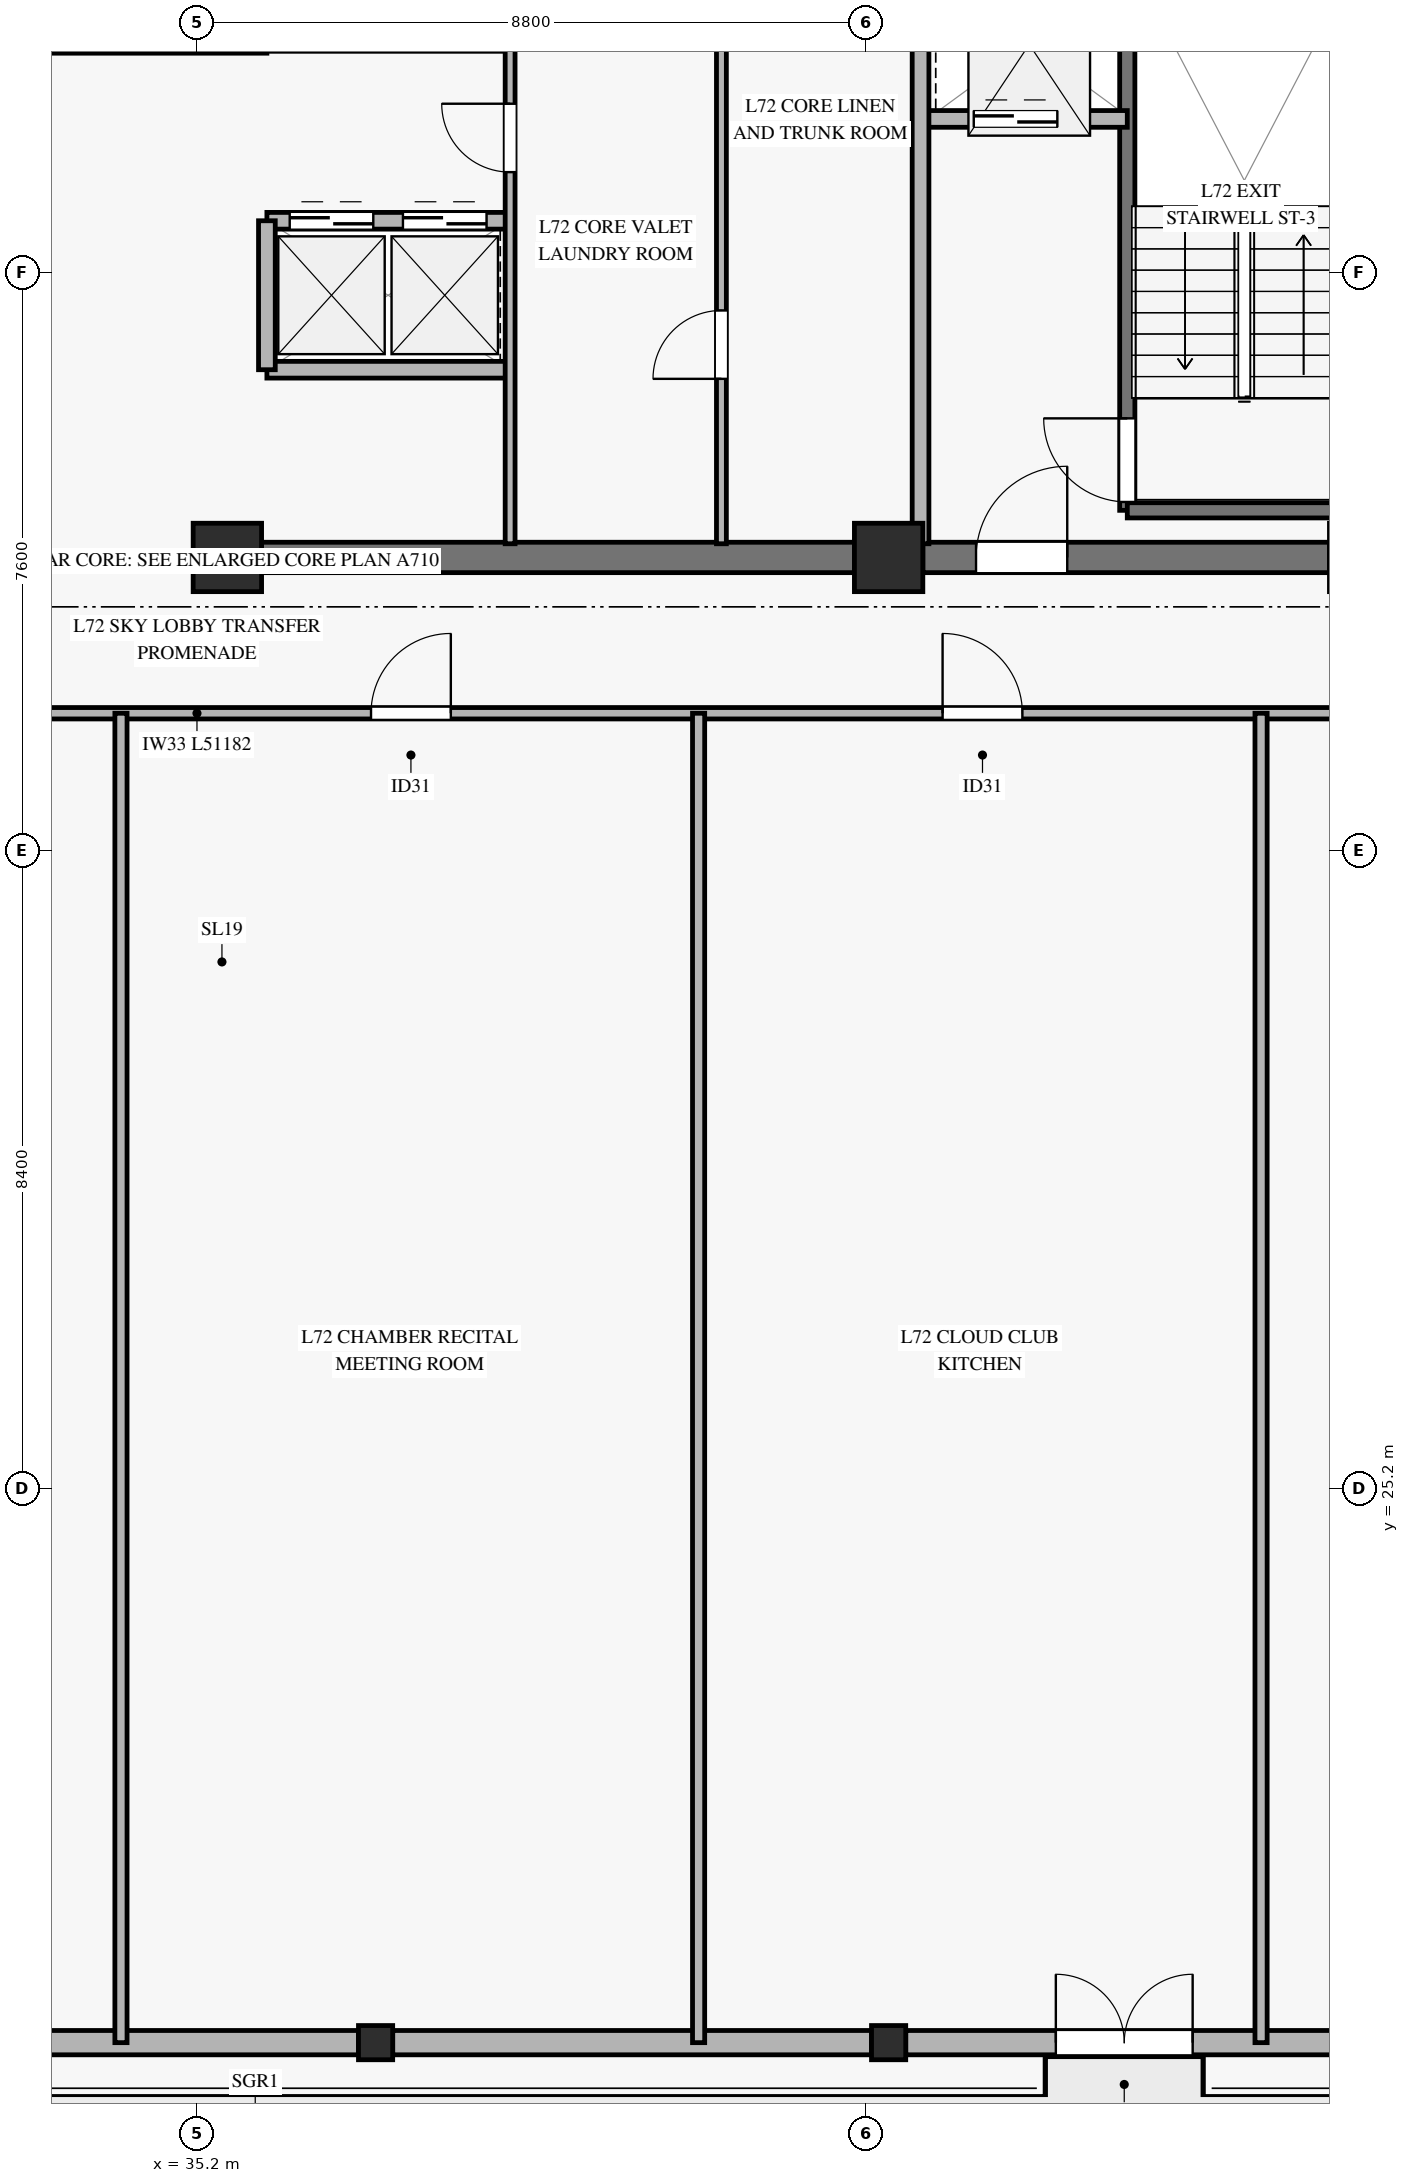
"""IFC4 building model, lengths in metres.
Left out: names, types, materials, properties, quantities, classifications, styles, units other than length and angle.
Written with IfcOpenShell. Run it as: python <this file> out.ifc"""

import sys

from ifc_helpers import new_model, si_unit, direction, frame, frame_2d, origin, origin_2d, place, context, subcontext, project, spatial, rectangle, hollow_rectangle, extrude, source, transform, mapped, element, fill, save


model = new_model("IFC4")
c1 = context("Model", 3, precision=1e-05, world=origin(), true_north=direction((0.0, 1.0)))
c2 = subcontext(c1, "Body", "Model", "MODEL_VIEW")
j1 = project(units=[si_unit("LENGTHUNIT", "METRE"), si_unit("PLANEANGLEUNIT", "RADIAN")], contexts=[c1])
p1 = place(None, origin())
s1 = spatial("IfcSite", under=j1, at=p1, CompositionType="ELEMENT")
p2 = place(p1, origin())
s2 = spatial("IfcBuilding", under=s1, at=p2, CompositionType="ELEMENT")
p3 = place(p2, frame((0.0, 0.0, 279.1)))
s3 = spatial("IfcBuildingStorey", under=s2, at=p3, CompositionType="ELEMENT", Elevation=279.1)
m1 = source(origin(), c2, "Body", "SweptSolid", [
    extrude(rectangle(XDim=0.9, YDim=0.9, at=origin_2d()), origin(), (0.0, 0.0, 1.0), 6.52),
])
for number, where, z_axis, x_axis in (
    (1, (35.6, 37.45, 0.0), (0.0, 0.0, 1.0), (1.0, 0.0, 0.0)),
    (2, (44.3, 37.45, 0.0), (0.0, 0.0, 1.0), (1.0, 0.0, 0.0)),
):
    element("IfcColumn", number, at=place(p3, frame(where, z_axis=z_axis, x_axis=x_axis)), inside=s3, PredefinedType="PILASTER", context=c2, shape_type="MappedRepresentation", body=[
        mapped(m1, transform((0.0, 0.0, 0.0), x_axis=(1.0, 0.0, 0.0), y_axis=(0.0, 1.0, 0.0), z_axis=(0.0, 0.0, 1.0), scale=1.0)),
    ])
p4 = place(p3, frame((36.05, 37.45, 0.0), z_axis=(0.0, 0.0, 1.0), x_axis=(1.0, 0.0, 0.0)))
e3 = element("IfcWall", 3, at=p4, inside=s3, PredefinedType="SHEAR", context=c2, shape_type="SweptSolid", body=[
    extrude(rectangle(XDim=7.8, YDim=0.4, at=frame_2d((3.9, 0.0))), origin(), (0.0, 0.0, 1.0), 6.52),
])
p5 = place(p3, frame((44.75, 37.45, 0.0), z_axis=(0.0, 0.0, 1.0), x_axis=(1.0, 0.0, 0.0)))
e4 = element("IfcWall", 4, at=p5, inside=s3, PredefinedType="SHEAR", context=c2, shape_type="SweptSolid", body=[
    extrude(rectangle(XDim=5.35, YDim=0.4, at=frame_2d((2.675, 0.0))), origin(), (0.0, 0.0, 1.0), 6.52),
])
p6 = place(p5, frame((0.7, 0.0, 0.0)))
e5 = element("IfcOpeningElement", 5, at=p6, cuts=e4, PredefinedType="OPENING", context=c2, shape_type="SweptSolid", body=[
    extrude(rectangle(XDim=1.2, YDim=2.15, at=frame_2d((0.6, 1.075))), frame((0.0, 0.21, 0.0), z_axis=(0.0, -1.0, 0.0), x_axis=(1.0, 0.0, 0.0)), (0.0, 0.0, 1.0), 0.42),
])
m2 = source(origin(), c2, "Body", "SweptSolid", [
    extrude(hollow_rectangle(XDim=0.45, YDim=0.45, WallThickness=0.022, at=origin_2d()), origin(), (0.0, 0.0, 1.0), 6.52),
])
for number, where, z_axis, x_axis in (
    (6, (37.55, 17.908, 0.0), (0.0, 0.0, 1.0), (1.0, 0.0, 0.0)),
    (7, (44.3, 17.908, 0.0), (0.0, 0.0, 1.0), (1.0, 0.0, 0.0)),
):
    element("IfcColumn", number, at=place(p3, frame(where, z_axis=z_axis, x_axis=x_axis)), inside=s3, PredefinedType="COLUMN", context=c2, shape_type="MappedRepresentation", body=[
        mapped(m2, transform((0.0, 0.0, 0.0), x_axis=(1.0, 0.0, 0.0), y_axis=(0.0, 1.0, 0.0), z_axis=(0.0, 0.0, 1.0), scale=1.0)),
    ])
for number, where, z_axis, x_axis in (
    (8, (31.025, 17.908, 0.0), (0.0, 0.0, 1.0), (1.0, 0.0, 0.0)),
    (9, (37.775, 17.908, 0.0), (0.0, 0.0, 1.0), (1.0, 0.0, 0.0)),
):
    element("IfcWall", number, at=place(p3, frame(where, z_axis=z_axis, x_axis=x_axis)), inside=s3, PredefinedType="SOLIDWALL", context=c2, shape_type="SweptSolid", body=[
        extrude(rectangle(XDim=6.3, YDim=0.32, at=frame_2d((3.15, 0.0))), origin(), (0.0, 0.0, 1.0), 6.15),
    ])
p7 = place(p3, frame((44.525, 17.908, 0.0), z_axis=(0.0, 0.0, 1.0), x_axis=(1.0, 0.0, 0.0)))
e10 = element("IfcWall", 10, at=p7, inside=s3, PredefinedType="SOLIDWALL", context=c2, shape_type="SweptSolid", body=[
    extrude(rectangle(XDim=5.8, YDim=0.32, at=frame_2d((2.9, 0.0))), origin(), (0.0, 0.0, 1.0), 6.15),
])
p8 = place(p7, frame((1.975, 0.0, 0.0)))
e11 = element("IfcOpeningElement", 11, at=p8, cuts=e10, PredefinedType="OPENING", context=c2, shape_type="SweptSolid", body=[
    extrude(rectangle(XDim=1.8, YDim=2.3, at=frame_2d((0.9, 1.15))), frame((0.0, 0.17, 0.0), z_axis=(0.0, -1.0, 0.0), x_axis=(1.0, 0.0, 0.0)), (0.0, 0.0, 1.0), 0.34),
])
p9 = place(p3, frame((47.44, 38.07, 0.0), z_axis=(0.0, 0.0, 1.0), x_axis=(0.0, 1.0, 0.0)))
e12 = element("IfcWall", 12, at=p9, inside=s3, PredefinedType="SOLIDWALL", context=c2, shape_type="SweptSolid", body=[
    extrude(rectangle(XDim=7.25, YDim=0.2, at=frame_2d((3.625, 0.0))), origin(), (0.0, 0.0, 1.0), 6.8),
])
p10 = place(p9, frame((0.11, 0.0, 0.0)))
e13 = element("IfcOpeningElement", 13, at=p10, cuts=e12, PredefinedType="OPENING", context=c2, shape_type="SweptSolid", body=[
    extrude(rectangle(XDim=1.1, YDim=2.15, at=frame_2d((0.55, 1.075))), frame((0.0, 0.11, 0.0), z_axis=(0.0, -1.0, 0.0), x_axis=(1.0, 0.0, 0.0)), (0.0, 0.0, 1.0), 0.22),
])
p11 = place(p3, frame((47.44, 38.07, 0.0), z_axis=(0.0, 0.0, 1.0), x_axis=(1.0, 0.0, 0.0)))
e14 = element("IfcWall", 14, at=p11, inside=s3, PredefinedType="SOLIDWALL", context=c2, shape_type="SweptSolid", body=[
    extrude(rectangle(XDim=2.93, YDim=0.2, at=frame_2d((1.465, 0.0))), origin(), (0.0, 0.0, 1.0), 6.8),
])
p12 = place(p3, frame((44.72, 43.22, 0.0), z_axis=(0.0, 0.0, 1.0), x_axis=(1.0, 0.0, 0.0)))
e15 = element("IfcWall", 15, at=p12, inside=s3, PredefinedType="SOLIDWALL", context=c2, shape_type="SweptSolid", body=[
    extrude(rectangle(XDim=2.72, YDim=0.22, at=frame_2d((1.36, 0.0))), origin(), (0.0, 0.0, 1.0), 6.52),
])
p13 = place(p12, frame((0.7, 0.0, 0.0)))
e16 = element("IfcOpeningElement", 16, at=p13, cuts=e15, PredefinedType="OPENING", context=c2, shape_type="SweptSolid", body=[
    extrude(rectangle(XDim=1.1, YDim=2.2, at=frame_2d((0.55, 1.1))), frame((0.0, 0.12, 0.0), z_axis=(0.0, -1.0, 0.0), x_axis=(1.0, 0.0, 0.0)), (0.0, 0.0, 1.0), 0.24),
])
p14 = place(p3, frame((44.72, 37.63, 0.0), z_axis=(0.0, 0.0, 1.0), x_axis=(0.0, 1.0, 0.0)))
e17 = element("IfcWall", 17, at=p14, inside=s3, PredefinedType="SOLIDWALL", context=c2, shape_type="SweptSolid", body=[
    extrude(rectangle(XDim=7.59, YDim=0.22, at=frame_2d((3.795, 0.0))), origin(), (0.0, 0.0, 1.0), 6.52),
])
p15 = place(p3, frame((36.12, 41.88, 0.0), z_axis=(0.0, 0.0, 1.0), x_axis=(1.0, 0.0, 0.0)))
e18 = element("IfcWall", 18, at=p15, inside=s3, PredefinedType="SOLIDWALL", context=c2, shape_type="SweptSolid", body=[
    extrude(rectangle(XDim=3.2, YDim=0.22, at=frame_2d((1.6, 0.0))), origin(), (0.0, 0.0, 1.0), 6.52),
])
p16 = place(p15, frame((0.3, 0.0, 0.0)))
e19 = element("IfcOpeningElement", 19, at=p16, cuts=e18, PredefinedType="OPENING", context=c2, shape_type="SweptSolid", body=[
    extrude(rectangle(XDim=1.1, YDim=2.2, at=frame_2d((0.55, 1.1))), frame((0.0, 0.12, 0.0), z_axis=(0.0, -1.0, 0.0), x_axis=(1.0, 0.0, 0.0)), (0.0, 0.0, 1.0), 0.24),
])
p17 = place(p15, frame((1.79, 0.0, 0.0)))
e20 = element("IfcOpeningElement", 20, at=p17, cuts=e18, PredefinedType="OPENING", context=c2, shape_type="SweptSolid", body=[
    extrude(rectangle(XDim=1.1, YDim=2.2, at=frame_2d((0.55, 1.1))), frame((0.0, 0.12, 0.0), z_axis=(0.0, -1.0, 0.0), x_axis=(1.0, 0.0, 0.0)), (0.0, 0.0, 1.0), 0.24),
])
p18 = place(p3, frame((36.12, 39.92, 0.0), z_axis=(0.0, 0.0, 1.0), x_axis=(1.0, 0.0, 0.0)))
e21 = element("IfcWall", 21, at=p18, inside=s3, PredefinedType="SOLIDWALL", context=c2, shape_type="SweptSolid", body=[
    extrude(rectangle(XDim=3.2, YDim=0.22, at=frame_2d((1.6, 0.0))), origin(), (0.0, 0.0, 1.0), 6.52),
])
p19 = place(p3, frame((36.12, 39.92, 0.0), z_axis=(0.0, 0.0, 1.0), x_axis=(0.0, 1.0, 0.0)))
e22 = element("IfcWall", 22, at=p19, inside=s3, PredefinedType="SOLIDWALL", context=c2, shape_type="SweptSolid", body=[
    extrude(rectangle(XDim=1.96, YDim=0.22, at=frame_2d((0.98, 0.0))), origin(), (0.0, 0.0, 1.0), 6.52),
])
p20 = place(p3, frame((33.18, 44.15, 0.0), z_axis=(0.0, 0.0, 1.0), x_axis=(1.0, 0.0, 0.0)))
e23 = element("IfcWall", 23, at=p20, inside=s3, PredefinedType="PARTITIONING", context=c2, shape_type="SweptSolid", body=[
    extrude(rectangle(XDim=2.94, YDim=0.13, at=frame_2d((1.47, 0.0))), origin(), (0.0, 0.0, 1.0), 5.805),
])
p21 = place(p3, frame((39.32, 37.63, 0.0), z_axis=(0.0, 0.0, 1.0), x_axis=(0.0, 1.0, 0.0)))
e24 = element("IfcWall", 24, at=p21, inside=s3, PredefinedType="PARTITIONING", context=c2, shape_type="SweptSolid", body=[
    extrude(rectangle(XDim=8.74, YDim=0.13, at=frame_2d((4.37, 0.0))), origin(), (0.0, 0.0, 1.0), 6.52),
])
p22 = place(p21, frame((4.89, 0.0, 0.0)))
e25 = element("IfcOpeningElement", 25, at=p22, cuts=e24, PredefinedType="OPENING", context=c2, shape_type="SweptSolid", body=[
    extrude(rectangle(XDim=0.9, YDim=2.1, at=frame_2d((0.45, 1.05))), frame((0.0, 0.075, 0.0), z_axis=(0.0, -1.0, 0.0), x_axis=(1.0, 0.0, 0.0)), (0.0, 0.0, 1.0), 0.15),
])
p23 = place(p3, frame((42.1, 37.63, 0.0), z_axis=(0.0, 0.0, 1.0), x_axis=(0.0, 1.0, 0.0)))
e26 = element("IfcWall", 26, at=p23, inside=s3, PredefinedType="PARTITIONING", context=c2, shape_type="SweptSolid", body=[
    extrude(rectangle(XDim=8.74, YDim=0.13, at=frame_2d((4.37, 0.0))), origin(), (0.0, 0.0, 1.0), 6.52),
])
p24 = place(p23, frame((2.17, 0.0, 0.0)))
e27 = element("IfcOpeningElement", 27, at=p24, cuts=e26, PredefinedType="OPENING", context=c2, shape_type="SweptSolid", body=[
    extrude(rectangle(XDim=0.9, YDim=2.1, at=frame_2d((0.45, 1.05))), frame((0.0, 0.075, 0.0), z_axis=(0.0, -1.0, 0.0), x_axis=(1.0, 0.0, 0.0)), (0.0, 0.0, 1.0), 0.15),
])
p25 = place(p3, frame((9.609, 35.4, 0.0), z_axis=(0.0, 0.0, 1.0), x_axis=(1.0, 0.0, 0.0)))
e28 = element("IfcWall", 28, at=p25, inside=s3, PredefinedType="PARTITIONING", context=c2, shape_type="SweptSolid", body=[
    extrude(rectangle(XDim=51.182, YDim=0.15, at=frame_2d((25.591, 0.0))), origin(), (0.0, 0.0, 1.0), 5.805),
])
p26 = place(p25, frame((5.806, 0.0, 0.0)))
e29 = element("IfcOpeningElement", 29, at=p26, cuts=e28, PredefinedType="OPENING", context=c2, shape_type="SweptSolid", body=[
    extrude(rectangle(XDim=1.05, YDim=2.15, at=frame_2d((0.525, 1.075))), frame((0.0, 0.085, 0.0), z_axis=(0.0, -1.0, 0.0), x_axis=(1.0, 0.0, 0.0)), (0.0, 0.0, 1.0), 0.17),
])
p27 = place(p25, frame((18.241, 0.0, 0.0)))
e30 = element("IfcOpeningElement", 30, at=p27, cuts=e28, PredefinedType="OPENING", context=c2, shape_type="SweptSolid", body=[
    extrude(rectangle(XDim=1.05, YDim=2.15, at=frame_2d((0.525, 1.075))), frame((0.0, 0.085, 0.0), z_axis=(0.0, -1.0, 0.0), x_axis=(1.0, 0.0, 0.0)), (0.0, 0.0, 1.0), 0.17),
])
p28 = place(p25, frame((27.881, 0.0, 0.0)))
e31 = element("IfcOpeningElement", 31, at=p28, cuts=e28, PredefinedType="OPENING", context=c2, shape_type="SweptSolid", body=[
    extrude(rectangle(XDim=1.05, YDim=2.15, at=frame_2d((0.525, 1.075))), frame((0.0, 0.085, 0.0), z_axis=(0.0, -1.0, 0.0), x_axis=(1.0, 0.0, 0.0)), (0.0, 0.0, 1.0), 0.17),
])
p29 = place(p25, frame((35.401, 0.0, 0.0)))
e32 = element("IfcOpeningElement", 32, at=p29, cuts=e28, PredefinedType="OPENING", context=c2, shape_type="SweptSolid", body=[
    extrude(rectangle(XDim=1.05, YDim=2.15, at=frame_2d((0.525, 1.075))), frame((0.0, 0.085, 0.0), z_axis=(0.0, -1.0, 0.0), x_axis=(1.0, 0.0, 0.0)), (0.0, 0.0, 1.0), 0.17),
])
p30 = place(p25, frame((44.397, 0.0, 0.0)))
e33 = element("IfcOpeningElement", 33, at=p30, cuts=e28, PredefinedType="OPENING", context=c2, shape_type="SweptSolid", body=[
    extrude(rectangle(XDim=1.05, YDim=2.15, at=frame_2d((0.525, 1.075))), frame((0.0, 0.085, 0.0), z_axis=(0.0, -1.0, 0.0), x_axis=(1.0, 0.0, 0.0)), (0.0, 0.0, 1.0), 0.17),
])
for number, where, z_axis, x_axis in (
    (34, (34.2, 17.908, 0.0), (0.0, 0.0, 1.0), (0.0, 1.0, 0.0)),
    (35, (41.8, 17.908, 0.0), (0.0, 0.0, 1.0), (0.0, 1.0, 0.0)),
    (36, (49.2, 17.908, 0.0), (0.0, 0.0, 1.0), (0.0, 1.0, 0.0)),
):
    element("IfcWall", number, at=place(p3, frame(where, z_axis=z_axis, x_axis=x_axis)), inside=s3, PredefinedType="PARTITIONING", context=c2, shape_type="SweptSolid", body=[
        extrude(rectangle(XDim=17.492, YDim=0.16, at=frame_2d((8.746, 0.0))), origin(), (0.0, 0.0, 1.0), 6.105),
    ])
m3 = source(origin(), c2, "Body", "SweptSolid", [
    extrude(rectangle(XDim=1.8, YDim=2.3, at=frame_2d((0.9, 1.15))), frame((0.0, 0.025, 0.0), z_axis=(0.0, -1.0, 0.0), x_axis=(1.0, 0.0, 0.0)), (0.0, 0.0, 1.0), 0.05),
])
p31 = place(p8, origin())
e37 = element("IfcDoor", 37, at=p31, inside=s3, OperationType="DOUBLE_SWING_RIGHT", PredefinedType="DOOR", context=c2, shape_type="MappedRepresentation", body=[
    mapped(m3, transform((0.0, 0.0, 0.0), x_axis=(1.0, 0.0, 0.0), y_axis=(0.0, 1.0, 0.0), z_axis=(0.0, 0.0, 1.0), scale=1.0)),
])
fill(e11, e37)
m4 = source(origin(), c2, "Body", "SweptSolid", [
    extrude(rectangle(XDim=1.1, YDim=2.15, at=frame_2d((0.55, 1.075))), frame((0.0, 0.025, 0.0), z_axis=(0.0, -1.0, 0.0), x_axis=(1.0, 0.0, 0.0)), (0.0, 0.0, 1.0), 0.05),
])
p32 = place(p10, origin())
e38 = element("IfcDoor", 38, at=p32, inside=s3, OperationType="SINGLE_SWING_RIGHT", PredefinedType="DOOR", context=c2, shape_type="MappedRepresentation", body=[
    mapped(m4, transform((0.0, 0.0, 0.0), x_axis=(1.0, 0.0, 0.0), y_axis=(0.0, 1.0, 0.0), z_axis=(0.0, 0.0, 1.0), scale=1.0)),
])
fill(e13, e38)
m5 = source(origin(), c2, "Body", "SweptSolid", [
    extrude(rectangle(XDim=1.1, YDim=2.2, at=frame_2d((0.55, 1.1))), frame((0.0, 0.025, 0.0), z_axis=(0.0, -1.0, 0.0), x_axis=(1.0, 0.0, 0.0)), (0.0, 0.0, 1.0), 0.05),
])
p33 = place(p13, origin())
e39 = element("IfcDoor", 39, at=p33, inside=s3, OperationType="SLIDING_TO_LEFT", PredefinedType="DOOR", context=c2, shape_type="MappedRepresentation", body=[
    mapped(m5, transform((0.0, 0.0, 0.0), x_axis=(1.0, 0.0, 0.0), y_axis=(0.0, 1.0, 0.0), z_axis=(0.0, 0.0, 1.0), scale=1.0)),
])
fill(e16, e39)
m6 = source(origin(), c2, "Body", "SweptSolid", [
    extrude(rectangle(XDim=1.2, YDim=2.15, at=frame_2d((0.6, 1.075))), frame((0.0, 0.025, 0.0), z_axis=(0.0, -1.0, 0.0), x_axis=(1.0, 0.0, 0.0)), (0.0, 0.0, 1.0), 0.05),
])
p34 = place(p6, origin())
e40 = element("IfcDoor", 40, at=p34, inside=s3, OperationType="SINGLE_SWING_RIGHT", PredefinedType="DOOR", context=c2, shape_type="MappedRepresentation", body=[
    mapped(m6, transform((0.0, 0.0, 0.0), x_axis=(1.0, 0.0, 0.0), y_axis=(0.0, 1.0, 0.0), z_axis=(0.0, 0.0, 1.0), scale=1.0)),
])
fill(e5, e40)
p35 = place(p16, origin())
e41 = element("IfcDoor", 41, at=p35, inside=s3, OperationType="SLIDING_TO_LEFT", PredefinedType="DOOR", context=c2, shape_type="MappedRepresentation", body=[
    mapped(m5, transform((0.0, 0.0, 0.0), x_axis=(1.0, 0.0, 0.0), y_axis=(0.0, 1.0, 0.0), z_axis=(0.0, 0.0, 1.0), scale=1.0)),
])
fill(e19, e41)
p36 = place(p17, origin())
e42 = element("IfcDoor", 42, at=p36, inside=s3, OperationType="SLIDING_TO_LEFT", PredefinedType="DOOR", context=c2, shape_type="MappedRepresentation", body=[
    mapped(m5, transform((0.0, 0.0, 0.0), x_axis=(1.0, 0.0, 0.0), y_axis=(0.0, 1.0, 0.0), z_axis=(0.0, 0.0, 1.0), scale=1.0)),
])
fill(e20, e42)
m7 = source(origin(), c2, "Body", "SweptSolid", [
    extrude(rectangle(XDim=0.9, YDim=2.1, at=frame_2d((0.45, 1.05))), frame((0.0, 0.025, 0.0), z_axis=(0.0, -1.0, 0.0), x_axis=(1.0, 0.0, 0.0)), (0.0, 0.0, 1.0), 0.05),
])
p37 = place(p22, origin())
e43 = element("IfcDoor", 43, at=p37, inside=s3, OperationType="SINGLE_SWING_RIGHT", PredefinedType="DOOR", context=c2, shape_type="MappedRepresentation", body=[
    mapped(m7, transform((0.0, 0.0, 0.0), x_axis=(1.0, 0.0, 0.0), y_axis=(0.0, 1.0, 0.0), z_axis=(0.0, 0.0, 1.0), scale=1.0)),
])
fill(e25, e43)
p38 = place(p24, origin())
e44 = element("IfcDoor", 44, at=p38, inside=s3, OperationType="SINGLE_SWING_LEFT", PredefinedType="DOOR", context=c2, shape_type="MappedRepresentation", body=[
    mapped(m7, transform((0.0, 0.0, 0.0), x_axis=(1.0, 0.0, 0.0), y_axis=(0.0, 1.0, 0.0), z_axis=(0.0, 0.0, 1.0), scale=1.0)),
])
fill(e27, e44)
m8 = source(origin(), c2, "Body", "SweptSolid", [
    extrude(rectangle(XDim=1.05, YDim=2.15, at=frame_2d((0.525, 1.075))), frame((0.0, 0.025, 0.0), z_axis=(0.0, -1.0, 0.0), x_axis=(1.0, 0.0, 0.0)), (0.0, 0.0, 1.0), 0.05),
])
p39 = place(p28, origin())
e45 = element("IfcDoor", 45, at=p39, inside=s3, OperationType="SINGLE_SWING_RIGHT", PredefinedType="DOOR", context=c2, shape_type="MappedRepresentation", body=[
    mapped(m8, transform((0.0, 0.0, 0.0), x_axis=(1.0, 0.0, 0.0), y_axis=(0.0, 1.0, 0.0), z_axis=(0.0, 0.0, 1.0), scale=1.0)),
])
fill(e31, e45)
p40 = place(p29, origin())
e46 = element("IfcDoor", 46, at=p40, inside=s3, OperationType="SINGLE_SWING_LEFT", PredefinedType="DOOR", context=c2, shape_type="MappedRepresentation", body=[
    mapped(m8, transform((0.0, 0.0, 0.0), x_axis=(1.0, 0.0, 0.0), y_axis=(0.0, 1.0, 0.0), z_axis=(0.0, 0.0, 1.0), scale=1.0)),
])
fill(e32, e46)
save(model, sys.argv[1])
